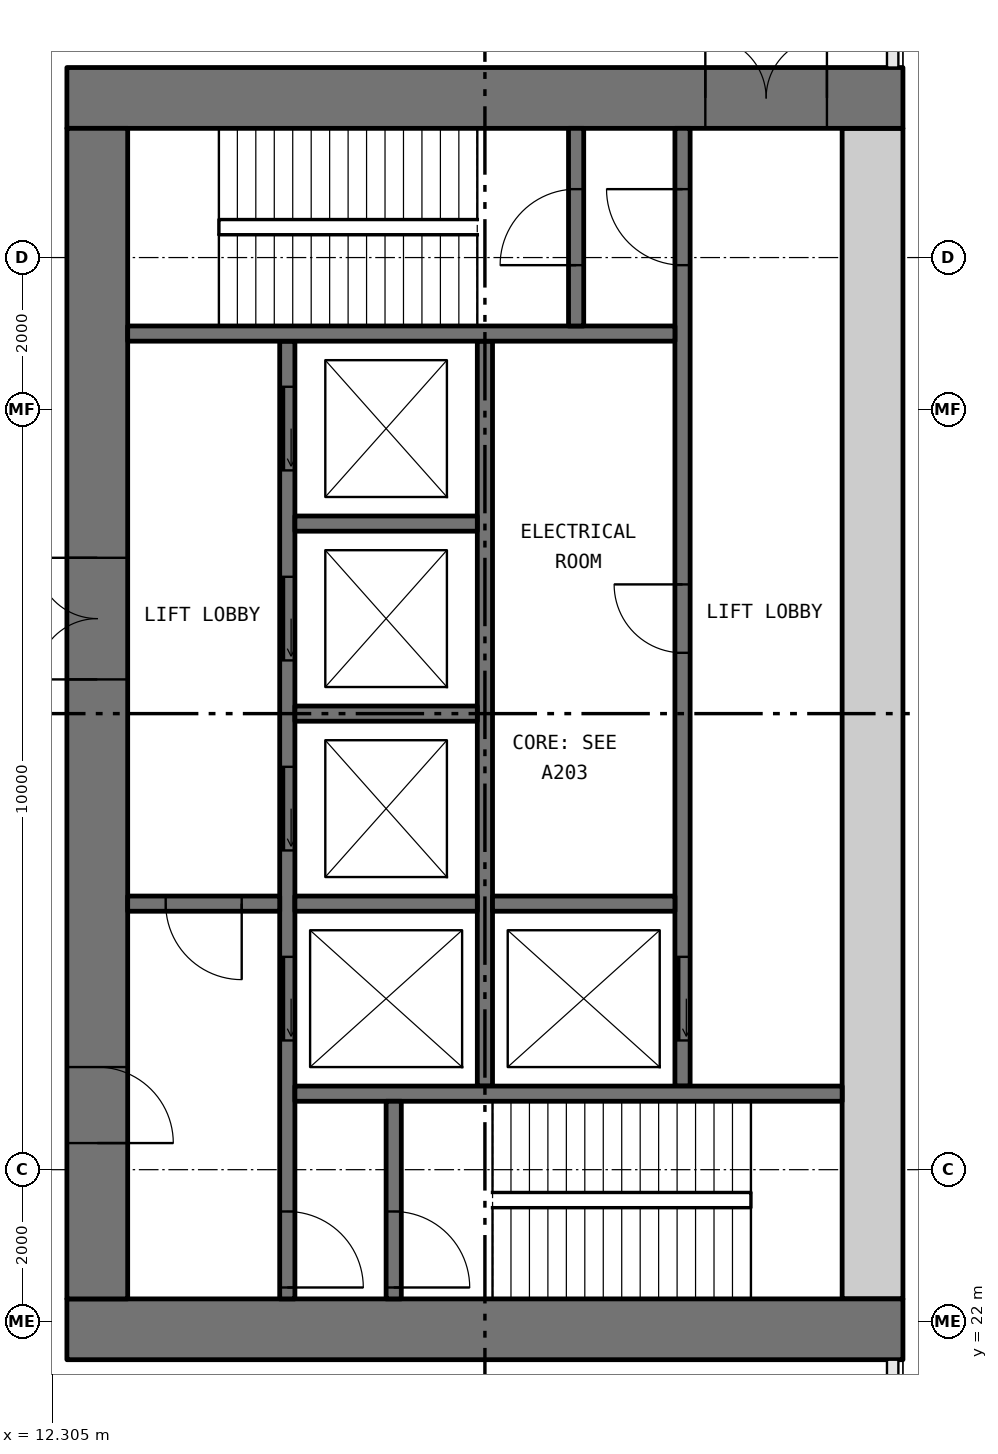
"""IFC4 building model, lengths in metres.
Left out: names, types, materials, properties, quantities, classifications, styles, units other than length and angle.
Written with IfcOpenShell. Run it as: python <this file> out.ifc"""

import sys

from ifc_helpers import new_model, si_unit, direction, frame, frame_2d, origin, place, context, subcontext, project, spatial, rectangle, extrude, element, fill, save


model = new_model("IFC4")
c1 = context("Model", 3, precision=1e-05, world=origin(), true_north=direction((0.0, 1.0)))
c2 = subcontext(c1, "Body", "Model", "MODEL_VIEW")
j1 = project(units=[si_unit("LENGTHUNIT", "METRE"), si_unit("PLANEANGLEUNIT", "RADIAN")], contexts=[c1])
p1 = place(None, origin())
s1 = spatial("IfcSite", under=j1, at=p1, CompositionType="ELEMENT")
p2 = place(p1, origin())
s2 = spatial("IfcBuilding", under=s1, at=p2, CompositionType="ELEMENT")
p3 = place(p2, frame((0.0, 0.0, 12.0)))
s3 = spatial("IfcBuildingStorey", under=s2, at=p3, CompositionType="ELEMENT", Elevation=12.0)
p4 = place(p3, frame((12.5, 21.9, 0.0), z_axis=(0.0, 0.0, 1.0), x_axis=(1.0, 0.0, 0.0)))
e1 = element("IfcWall", 1, at=p4, inside=s3, PredefinedType="SHEAR", context=c2, shape_type="SweptSolid", body=[
    extrude(rectangle(XDim=11.0, YDim=0.8, at=frame_2d((5.5, 0.0))), origin(), (0.0, 0.0, 1.0), 5.6),
])
p5 = place(p3, frame((12.5, 38.1, 0.0), z_axis=(0.0, 0.0, 1.0), x_axis=(1.0, 0.0, 0.0)))
e2 = element("IfcWall", 2, at=p5, inside=s3, PredefinedType="SHEAR", context=c2, shape_type="SweptSolid", body=[
    extrude(rectangle(XDim=11.0, YDim=0.8, at=frame_2d((5.5, 0.0))), origin(), (0.0, 0.0, 1.0), 5.6),
])
p6 = place(p5, frame((8.4, 0.0, 0.0)))
e3 = element("IfcOpeningElement", 3, at=p6, cuts=e2, PredefinedType="OPENING", context=c2, shape_type="SweptSolid", body=[
    extrude(rectangle(XDim=1.6, YDim=2.1, at=frame_2d((0.8, 1.05))), frame((0.0, 0.41, 0.0), z_axis=(0.0, -1.0, 0.0), x_axis=(1.0, 0.0, 0.0)), (0.0, 0.0, 1.0), 0.82),
])
p7 = place(p3, frame((12.9, 22.3, 0.0), z_axis=(0.0, 0.0, 1.0), x_axis=(0.0, 1.0, 0.0)))
e4 = element("IfcWall", 4, at=p7, inside=s3, PredefinedType="SHEAR", context=c2, shape_type="SweptSolid", body=[
    extrude(rectangle(XDim=15.4, YDim=0.8, at=frame_2d((7.7, 0.0))), origin(), (0.0, 0.0, 1.0), 5.6),
])
p8 = place(p7, frame((8.15, 0.0, 0.0)))
e5 = element("IfcOpeningElement", 5, at=p8, cuts=e4, PredefinedType="OPENING", context=c2, shape_type="SweptSolid", body=[
    extrude(rectangle(XDim=1.6, YDim=2.1, at=frame_2d((0.8, 1.05))), frame((0.0, 0.41, 0.0), z_axis=(0.0, -1.0, 0.0), x_axis=(1.0, 0.0, 0.0)), (0.0, 0.0, 1.0), 0.82),
])
p9 = place(p7, frame((2.05, 0.0, 0.0)))
e6 = element("IfcOpeningElement", 6, at=p9, cuts=e4, PredefinedType="OPENING", context=c2, shape_type="SweptSolid", body=[
    extrude(rectangle(XDim=1.0, YDim=2.1, at=frame_2d((0.5, 1.05))), frame((0.0, 0.41, 0.0), z_axis=(0.0, -1.0, 0.0), x_axis=(1.0, 0.0, 0.0)), (0.0, 0.0, 1.0), 0.82),
])
p10 = place(p3, frame((23.1, 22.3, 0.0), z_axis=(0.0, 0.0, 1.0), x_axis=(0.0, 1.0, 0.0)))
e7 = element("IfcWall", 7, at=p10, inside=s3, PredefinedType="SHEAR", context=c2, shape_type="SweptSolid", body=[
    extrude(rectangle(XDim=15.4, YDim=0.8, at=frame_2d((7.7, 0.0))), origin(), (0.0, 0.0, 1.0), 5.6),
])
p11 = place(p3, frame((15.4, 22.3, 0.0), z_axis=(0.0, 0.0, 1.0), x_axis=(0.0, 1.0, 0.0)))
e8 = element("IfcWall", 8, at=p11, inside=s3, PredefinedType="SOLIDWALL", context=c2, shape_type="SweptSolid", body=[
    extrude(rectangle(XDim=12.6, YDim=0.2, at=frame_2d((6.3, 0.0))), origin(), (0.0, 0.0, 1.0), 5.6),
])
p12 = place(p11, frame((3.4, 0.0, 0.0)))
e9 = element("IfcOpeningElement", 9, at=p12, cuts=e8, PredefinedType="OPENING", context=c2, shape_type="SweptSolid", body=[
    extrude(rectangle(XDim=1.1, YDim=2.1, at=frame_2d((0.55, 1.05))), frame((0.0, 0.11, 0.0), z_axis=(0.0, -1.0, 0.0), x_axis=(1.0, 0.0, 0.0)), (0.0, 0.0, 1.0), 0.22),
])
p13 = place(p11, frame((5.9, 0.0, 0.0)))
e10 = element("IfcOpeningElement", 10, at=p13, cuts=e8, PredefinedType="OPENING", context=c2, shape_type="SweptSolid", body=[
    extrude(rectangle(XDim=1.1, YDim=2.1, at=frame_2d((0.55, 1.05))), frame((0.0, 0.11, 0.0), z_axis=(0.0, -1.0, 0.0), x_axis=(1.0, 0.0, 0.0)), (0.0, 0.0, 1.0), 0.22),
])
p14 = place(p11, frame((8.4, 0.0, 0.0)))
e11 = element("IfcOpeningElement", 11, at=p14, cuts=e8, PredefinedType="OPENING", context=c2, shape_type="SweptSolid", body=[
    extrude(rectangle(XDim=1.1, YDim=2.1, at=frame_2d((0.55, 1.05))), frame((0.0, 0.11, 0.0), z_axis=(0.0, -1.0, 0.0), x_axis=(1.0, 0.0, 0.0)), (0.0, 0.0, 1.0), 0.22),
])
p15 = place(p11, frame((10.9, 0.0, 0.0)))
e12 = element("IfcOpeningElement", 12, at=p15, cuts=e8, PredefinedType="OPENING", context=c2, shape_type="SweptSolid", body=[
    extrude(rectangle(XDim=1.1, YDim=2.1, at=frame_2d((0.55, 1.05))), frame((0.0, 0.11, 0.0), z_axis=(0.0, -1.0, 0.0), x_axis=(1.0, 0.0, 0.0)), (0.0, 0.0, 1.0), 0.22),
])
p16 = place(p11, frame((0.15, 0.0, 0.0)))
e13 = element("IfcOpeningElement", 13, at=p16, cuts=e8, PredefinedType="OPENING", context=c2, shape_type="SweptSolid", body=[
    extrude(rectangle(XDim=1.0, YDim=2.1, at=frame_2d((0.5, 1.05))), frame((0.0, 0.11, 0.0), z_axis=(0.0, -1.0, 0.0), x_axis=(1.0, 0.0, 0.0)), (0.0, 0.0, 1.0), 0.22),
])
p17 = place(p3, frame((20.6, 25.1, 0.0), z_axis=(0.0, 0.0, 1.0), x_axis=(0.0, 1.0, 0.0)))
e14 = element("IfcWall", 14, at=p17, inside=s3, PredefinedType="SOLIDWALL", context=c2, shape_type="SweptSolid", body=[
    extrude(rectangle(XDim=12.6, YDim=0.2, at=frame_2d((6.3, 0.0))), origin(), (0.0, 0.0, 1.0), 5.6),
])
p18 = place(p17, frame((0.6, 0.0, 0.0)))
e15 = element("IfcOpeningElement", 15, at=p18, cuts=e14, PredefinedType="OPENING", context=c2, shape_type="SweptSolid", body=[
    extrude(rectangle(XDim=1.1, YDim=2.1, at=frame_2d((0.55, 1.05))), frame((0.0, 0.11, 0.0), z_axis=(0.0, -1.0, 0.0), x_axis=(1.0, 0.0, 0.0)), (0.0, 0.0, 1.0), 0.22),
])
p19 = place(p17, frame((10.8, 0.0, 0.0)))
e16 = element("IfcOpeningElement", 16, at=p19, cuts=e14, PredefinedType="OPENING", context=c2, shape_type="SweptSolid", body=[
    extrude(rectangle(XDim=1.0, YDim=2.1, at=frame_2d((0.5, 1.05))), frame((0.0, 0.11, 0.0), z_axis=(0.0, -1.0, 0.0), x_axis=(1.0, 0.0, 0.0)), (0.0, 0.0, 1.0), 0.22),
])
p20 = place(p17, frame((5.7, 0.0, 0.0)))
e17 = element("IfcOpeningElement", 17, at=p20, cuts=e14, PredefinedType="OPENING", context=c2, shape_type="SweptSolid", body=[
    extrude(rectangle(XDim=0.9, YDim=2.1, at=frame_2d((0.45, 1.05))), frame((0.0, 0.11, 0.0), z_axis=(0.0, -1.0, 0.0), x_axis=(1.0, 0.0, 0.0)), (0.0, 0.0, 1.0), 0.22),
])
p21 = place(p3, frame((18.0, 25.1, 0.0), z_axis=(0.0, 0.0, 1.0), x_axis=(0.0, 1.0, 0.0)))
e18 = element("IfcWall", 18, at=p21, inside=s3, PredefinedType="SOLIDWALL", context=c2, shape_type="SweptSolid", body=[
    extrude(rectangle(XDim=9.8, YDim=0.2, at=frame_2d((4.9, 0.0))), origin(), (0.0, 0.0, 1.0), 5.6),
])
for number, where, z_axis, x_axis in (
    (19, (15.5, 25.0, 0.0), (0.0, 0.0, 1.0), (1.0, 0.0, 0.0)),
    (20, (13.3, 35.0, 0.0), (0.0, 0.0, 1.0), (1.0, 0.0, 0.0)),
):
    element("IfcWall", number, at=place(p3, frame(where, z_axis=z_axis, x_axis=x_axis)), inside=s3, PredefinedType="SOLIDWALL", context=c2, shape_type="SweptSolid", body=[
        extrude(rectangle(XDim=7.2, YDim=0.2, at=frame_2d((3.6, 0.0))), origin(), (0.0, 0.0, 1.0), 5.6),
    ])
p22 = place(p3, frame((13.3, 27.5, 0.0), z_axis=(0.0, 0.0, 1.0), x_axis=(1.0, 0.0, 0.0)))
e21 = element("IfcWall", 21, at=p22, inside=s3, PredefinedType="SOLIDWALL", context=c2, shape_type="SweptSolid", body=[
    extrude(rectangle(XDim=2.0, YDim=0.2, at=frame_2d((1.0, 0.0))), origin(), (0.0, 0.0, 1.0), 5.6),
])
p23 = place(p22, frame((0.5, 0.0, 0.0)))
e22 = element("IfcOpeningElement", 22, at=p23, cuts=e21, PredefinedType="OPENING", context=c2, shape_type="SweptSolid", body=[
    extrude(rectangle(XDim=1.0, YDim=2.1, at=frame_2d((0.5, 1.05))), frame((0.0, 0.11, 0.0), z_axis=(0.0, -1.0, 0.0), x_axis=(1.0, 0.0, 0.0)), (0.0, 0.0, 1.0), 0.22),
])
p24 = place(p3, frame((16.8, 22.3, 0.0), z_axis=(0.0, 0.0, 1.0), x_axis=(0.0, 1.0, 0.0)))
e23 = element("IfcWall", 23, at=p24, inside=s3, PredefinedType="SOLIDWALL", context=c2, shape_type="SweptSolid", body=[
    extrude(rectangle(XDim=2.6, YDim=0.2, at=frame_2d((1.3, 0.0))), origin(), (0.0, 0.0, 1.0), 5.6),
])
p25 = place(p24, frame((0.15, 0.0, 0.0)))
e24 = element("IfcOpeningElement", 24, at=p25, cuts=e23, PredefinedType="OPENING", context=c2, shape_type="SweptSolid", body=[
    extrude(rectangle(XDim=1.0, YDim=2.1, at=frame_2d((0.5, 1.05))), frame((0.0, 0.11, 0.0), z_axis=(0.0, -1.0, 0.0), x_axis=(1.0, 0.0, 0.0)), (0.0, 0.0, 1.0), 0.22),
])
p26 = place(p3, frame((19.2, 35.1, 0.0), z_axis=(0.0, 0.0, 1.0), x_axis=(0.0, 1.0, 0.0)))
e25 = element("IfcWall", 25, at=p26, inside=s3, PredefinedType="SOLIDWALL", context=c2, shape_type="SweptSolid", body=[
    extrude(rectangle(XDim=2.6, YDim=0.2, at=frame_2d((1.3, 0.0))), origin(), (0.0, 0.0, 1.0), 5.6),
])
p27 = place(p26, frame((0.8, 0.0, 0.0)))
e26 = element("IfcOpeningElement", 26, at=p27, cuts=e25, PredefinedType="OPENING", context=c2, shape_type="SweptSolid", body=[
    extrude(rectangle(XDim=1.0, YDim=2.1, at=frame_2d((0.5, 1.05))), frame((0.0, 0.11, 0.0), z_axis=(0.0, -1.0, 0.0), x_axis=(1.0, 0.0, 0.0)), (0.0, 0.0, 1.0), 0.22),
])
for number, where, z_axis, x_axis in (
    (27, (15.5, 27.5, 0.0), (0.0, 0.0, 1.0), (1.0, 0.0, 0.0)),
    (28, (15.5, 30.0, 0.0), (0.0, 0.0, 1.0), (1.0, 0.0, 0.0)),
    (29, (15.5, 32.5, 0.0), (0.0, 0.0, 1.0), (1.0, 0.0, 0.0)),
    (30, (18.1, 27.5, 0.0), (0.0, 0.0, 1.0), (1.0, 0.0, 0.0)),
):
    element("IfcWall", number, at=place(p3, frame(where, z_axis=z_axis, x_axis=x_axis)), inside=s3, PredefinedType="SOLIDWALL", context=c2, shape_type="SweptSolid", body=[
        extrude(rectangle(XDim=2.4, YDim=0.2, at=frame_2d((1.2, 0.0))), origin(), (0.0, 0.0, 1.0), 5.6),
    ])
p28 = place(p18, origin())
e31 = element("IfcDoor", 31, at=p28, inside=s3, OperationType="SLIDING_TO_LEFT", PredefinedType="DOOR", context=c2, shape_type="SweptSolid", body=[
    extrude(rectangle(XDim=1.1, YDim=2.1, at=frame_2d((0.55, 1.05))), frame((0.0, 0.025, 0.0), z_axis=(0.0, -1.0, 0.0), x_axis=(1.0, 0.0, 0.0)), (0.0, 0.0, 1.0), 0.05),
])
fill(e15, e31)
p29 = place(p12, origin())
e32 = element("IfcDoor", 32, at=p29, inside=s3, OperationType="SLIDING_TO_LEFT", PredefinedType="DOOR", context=c2, shape_type="SweptSolid", body=[
    extrude(rectangle(XDim=1.1, YDim=2.1, at=frame_2d((0.55, 1.05))), frame((0.0, 0.025, 0.0), z_axis=(0.0, -1.0, 0.0), x_axis=(1.0, 0.0, 0.0)), (0.0, 0.0, 1.0), 0.05),
])
fill(e9, e32)
p30 = place(p13, origin())
e33 = element("IfcDoor", 33, at=p30, inside=s3, OperationType="SLIDING_TO_LEFT", PredefinedType="DOOR", context=c2, shape_type="SweptSolid", body=[
    extrude(rectangle(XDim=1.1, YDim=2.1, at=frame_2d((0.55, 1.05))), frame((0.0, 0.025, 0.0), z_axis=(0.0, -1.0, 0.0), x_axis=(1.0, 0.0, 0.0)), (0.0, 0.0, 1.0), 0.05),
])
fill(e10, e33)
p31 = place(p14, origin())
e34 = element("IfcDoor", 34, at=p31, inside=s3, OperationType="SLIDING_TO_LEFT", PredefinedType="DOOR", context=c2, shape_type="SweptSolid", body=[
    extrude(rectangle(XDim=1.1, YDim=2.1, at=frame_2d((0.55, 1.05))), frame((0.0, 0.025, 0.0), z_axis=(0.0, -1.0, 0.0), x_axis=(1.0, 0.0, 0.0)), (0.0, 0.0, 1.0), 0.05),
])
fill(e11, e34)
p32 = place(p15, origin())
e35 = element("IfcDoor", 35, at=p32, inside=s3, OperationType="SLIDING_TO_LEFT", PredefinedType="DOOR", context=c2, shape_type="SweptSolid", body=[
    extrude(rectangle(XDim=1.1, YDim=2.1, at=frame_2d((0.55, 1.05))), frame((0.0, 0.025, 0.0), z_axis=(0.0, -1.0, 0.0), x_axis=(1.0, 0.0, 0.0)), (0.0, 0.0, 1.0), 0.05),
])
fill(e12, e35)
p33 = place(p25, frame((1.0, 0.0, 0.0), x_axis=(-1.0, 0.0, 0.0)))
e36 = element("IfcDoor", 36, at=p33, inside=s3, OperationType="SINGLE_SWING_LEFT", PredefinedType="DOOR", context=c2, shape_type="SweptSolid", body=[
    extrude(rectangle(XDim=1.0, YDim=2.1, at=frame_2d((0.5, 1.05))), frame((0.0, 0.025, 0.0), z_axis=(0.0, -1.0, 0.0), x_axis=(1.0, 0.0, 0.0)), (0.0, 0.0, 1.0), 0.05),
])
fill(e24, e36)
p34 = place(p16, frame((1.0, 0.0, 0.0), x_axis=(-1.0, 0.0, 0.0)))
e37 = element("IfcDoor", 37, at=p34, inside=s3, OperationType="SINGLE_SWING_LEFT", PredefinedType="DOOR", context=c2, shape_type="SweptSolid", body=[
    extrude(rectangle(XDim=1.0, YDim=2.1, at=frame_2d((0.5, 1.05))), frame((0.0, 0.025, 0.0), z_axis=(0.0, -1.0, 0.0), x_axis=(1.0, 0.0, 0.0)), (0.0, 0.0, 1.0), 0.05),
])
fill(e13, e37)
p35 = place(p19, origin())
e38 = element("IfcDoor", 38, at=p35, inside=s3, OperationType="SINGLE_SWING_LEFT", PredefinedType="DOOR", context=c2, shape_type="SweptSolid", body=[
    extrude(rectangle(XDim=1.0, YDim=2.1, at=frame_2d((0.5, 1.05))), frame((0.0, 0.025, 0.0), z_axis=(0.0, -1.0, 0.0), x_axis=(1.0, 0.0, 0.0)), (0.0, 0.0, 1.0), 0.05),
])
fill(e16, e38)
p36 = place(p27, origin())
e39 = element("IfcDoor", 39, at=p36, inside=s3, OperationType="SINGLE_SWING_RIGHT", PredefinedType="DOOR", context=c2, shape_type="SweptSolid", body=[
    extrude(rectangle(XDim=1.0, YDim=2.1, at=frame_2d((0.5, 1.05))), frame((0.0, 0.025, 0.0), z_axis=(0.0, -1.0, 0.0), x_axis=(1.0, 0.0, 0.0)), (0.0, 0.0, 1.0), 0.05),
])
fill(e26, e39)
p37 = place(p23, frame((1.0, 0.0, 0.0), x_axis=(-1.0, 0.0, 0.0)))
e40 = element("IfcDoor", 40, at=p37, inside=s3, OperationType="SINGLE_SWING_RIGHT", PredefinedType="DOOR", context=c2, shape_type="SweptSolid", body=[
    extrude(rectangle(XDim=1.0, YDim=2.1, at=frame_2d((0.5, 1.05))), frame((0.0, 0.025, 0.0), z_axis=(0.0, -1.0, 0.0), x_axis=(1.0, 0.0, 0.0)), (0.0, 0.0, 1.0), 0.05),
])
fill(e22, e40)
p38 = place(p8, origin())
e41 = element("IfcDoor", 41, at=p38, inside=s3, OperationType="DOUBLE_DOOR_SINGLE_SWING", PredefinedType="DOOR", context=c2, shape_type="SweptSolid", body=[
    extrude(rectangle(XDim=1.6, YDim=2.1, at=frame_2d((0.8, 1.05))), frame((0.0, 0.025, 0.0), z_axis=(0.0, -1.0, 0.0), x_axis=(1.0, 0.0, 0.0)), (0.0, 0.0, 1.0), 0.05),
])
fill(e5, e41)
p39 = place(p9, frame((1.0, 0.0, 0.0), x_axis=(-1.0, 0.0, 0.0)))
e42 = element("IfcDoor", 42, at=p39, inside=s3, OperationType="SINGLE_SWING_LEFT", PredefinedType="DOOR", context=c2, shape_type="SweptSolid", body=[
    extrude(rectangle(XDim=1.0, YDim=2.1, at=frame_2d((0.5, 1.05))), frame((0.0, 0.025, 0.0), z_axis=(0.0, -1.0, 0.0), x_axis=(1.0, 0.0, 0.0)), (0.0, 0.0, 1.0), 0.05),
])
fill(e6, e42)
p40 = place(p6, origin())
e43 = element("IfcDoor", 43, at=p40, inside=s3, OperationType="DOUBLE_DOOR_SINGLE_SWING", PredefinedType="DOOR", context=c2, shape_type="SweptSolid", body=[
    extrude(rectangle(XDim=1.6, YDim=2.1, at=frame_2d((0.8, 1.05))), frame((0.0, 0.025, 0.0), z_axis=(0.0, -1.0, 0.0), x_axis=(1.0, 0.0, 0.0)), (0.0, 0.0, 1.0), 0.05),
])
fill(e3, e43)
p41 = place(p20, origin())
e44 = element("IfcDoor", 44, at=p41, inside=s3, OperationType="SINGLE_SWING_LEFT", PredefinedType="DOOR", context=c2, shape_type="SweptSolid", body=[
    extrude(rectangle(XDim=0.9, YDim=2.1, at=frame_2d((0.45, 1.05))), frame((0.0, 0.025, 0.0), z_axis=(0.0, -1.0, 0.0), x_axis=(1.0, 0.0, 0.0)), (0.0, 0.0, 1.0), 0.05),
])
fill(e17, e44)
save(model, sys.argv[1])
